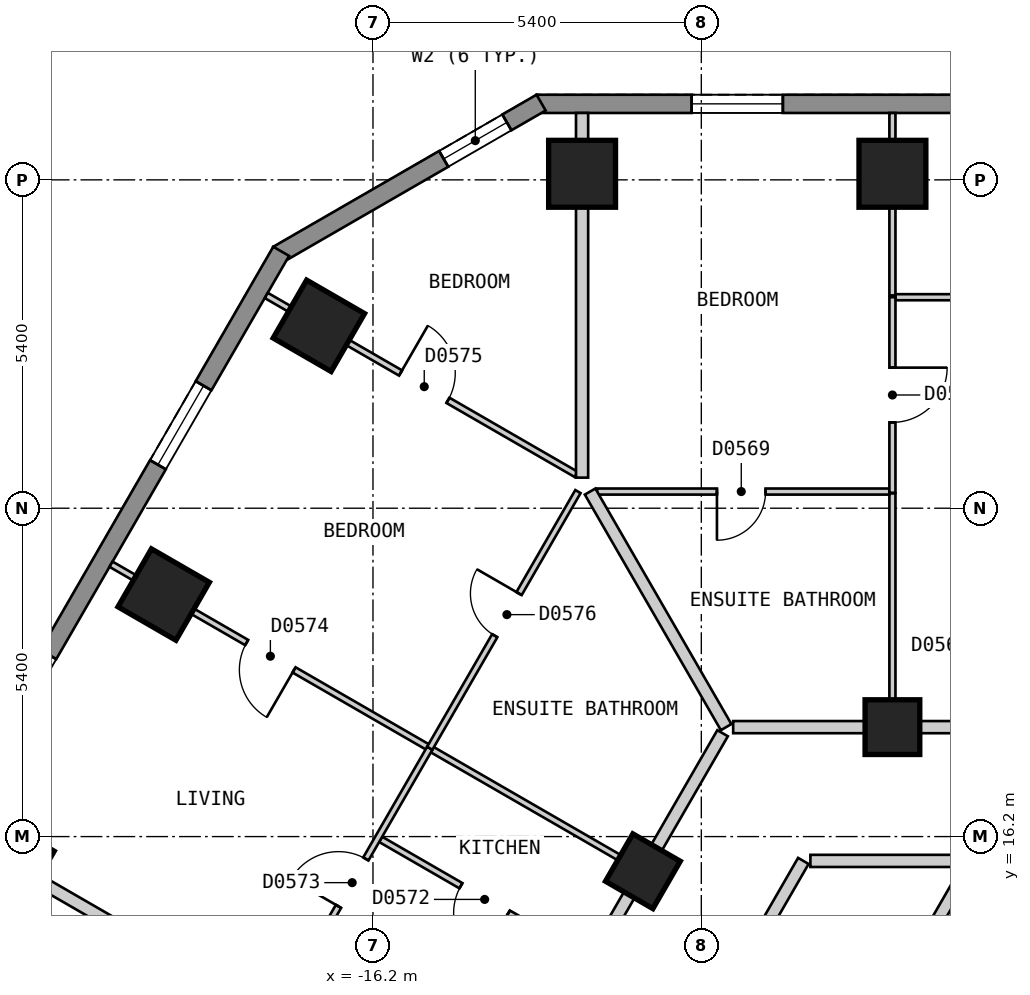
"""IFC4 building model, lengths in metres.
Left out: names, types, materials, properties, quantities, classifications, styles, units other than length and angle.
Written with IfcOpenShell. Run it as: python <this file> out.ifc"""

import sys

from ifc_helpers import new_model, si_unit, direction, frame, frame_2d, origin, origin_2d, place, context, subcontext, project, spatial, polyline, rectangle, outline, extrude, element, fill, save


model = new_model("IFC4")
c1 = context("Model", 3, precision=1e-05, world=origin(), true_north=direction((0.0, 1.0)))
c2 = subcontext(c1, "Body", "Model", "MODEL_VIEW")
j1 = project(units=[si_unit("LENGTHUNIT", "METRE"), si_unit("PLANEANGLEUNIT", "RADIAN")], contexts=[c1])
p1 = place(None, origin())
s1 = spatial("IfcSite", under=j1, at=p1, CompositionType="ELEMENT")
p2 = place(p1, origin())
s2 = spatial("IfcBuilding", under=s1, at=p2, CompositionType="ELEMENT")
p3 = place(p2, frame((0.0, 0.0, 44.4)))
s3 = spatial("IfcBuildingStorey", under=s2, at=p3, CompositionType="ELEMENT", Elevation=44.4)
for number, where, z_axis, x_axis in (
    (1, (-7.657, 27.1, 0.0), (0.0, 0.0, 1.0), (-1.0, 0.0, 0.0)),
    (2, (-12.761, 27.1, 0.0), (0.0, 0.0, 1.0), (-1.0, 0.0, 0.0)),
    (3, (-17.09, 24.6, 0.0), (0.0, 0.0, 1.0), (-0.5, -0.866, 0.0)),
    (4, (-19.642, 20.18, 0.0), (0.0, 0.0, 1.0), (-0.5, -0.866, 0.0)),
    (5, (-22.194, 15.759, 0.0), (0.0, 0.0, 1.0), (-0.5, -0.866, 0.0)),
):
    element("IfcColumn", number, at=place(p3, frame(where, z_axis=z_axis, x_axis=x_axis)), inside=s3, PredefinedType="COLUMN", context=c2, shape_type="SweptSolid", body=[
        extrude(rectangle(XDim=1.1, YDim=1.1, at=origin_2d()), origin(), (0.0, 0.0, 1.0), 3.0),
    ])
for number, where, z_axis, x_axis in (
    (6, (-7.657, 18.0, 0.0), (0.0, 0.0, 1.0), (-1.0, 0.0, 0.0)),
    (7, (-11.761, 15.63, 0.0), (0.0, 0.0, 1.0), (-0.5, -0.866, 0.0)),
):
    element("IfcColumn", number, at=place(p3, frame(where, z_axis=z_axis, x_axis=x_axis)), inside=s3, PredefinedType="COLUMN", context=c2, shape_type="SweptSolid", body=[
        extrude(rectangle(XDim=0.9, YDim=0.9, at=origin_2d()), origin(), (0.0, 0.0, 1.0), 3.0),
    ])
p4 = place(p3, frame((13.51, 28.25, 0.0), z_axis=(0.0, 0.0, 1.0), x_axis=(-1.0, 0.0, 0.0)))
e8 = element("IfcWall", 8, at=p4, inside=s3, PredefinedType="SOLIDWALL", context=c2, shape_type="SweptSolid", body=[
    extrude(outline(polyline([(0.0, -0.15), (27.02, -0.15), (26.94, 0.15), (0.08, 0.15), (0.0, -0.15)])), origin(), (0.0, 0.0, 1.0), 2.7),
])
p5 = place(p4, frame((2.553, 0.0, 0.15)))
e9 = element("IfcOpeningElement", 9, at=p5, cuts=e8, PredefinedType="OPENING", context=c2, shape_type="SweptSolid", body=[
    extrude(rectangle(XDim=1.5, YDim=2.1, at=frame_2d((0.75, 1.05))), frame((0.0, 0.16, 0.0), z_axis=(0.0, -1.0, 0.0), x_axis=(1.0, 0.0, 0.0)), (0.0, 0.0, 1.0), 0.32),
])
p6 = place(p4, frame((7.657, 0.0, 0.15)))
e10 = element("IfcOpeningElement", 10, at=p6, cuts=e8, PredefinedType="OPENING", context=c2, shape_type="SweptSolid", body=[
    extrude(rectangle(XDim=1.5, YDim=2.1, at=frame_2d((0.75, 1.05))), frame((0.0, 0.16, 0.0), z_axis=(0.0, -1.0, 0.0), x_axis=(1.0, 0.0, 0.0)), (0.0, 0.0, 1.0), 0.32),
])
p7 = place(p4, frame((12.761, 0.0, 0.15)))
e11 = element("IfcOpeningElement", 11, at=p7, cuts=e8, PredefinedType="OPENING", context=c2, shape_type="SweptSolid", body=[
    extrude(rectangle(XDim=1.5, YDim=2.1, at=frame_2d((0.75, 1.05))), frame((0.0, 0.16, 0.0), z_axis=(0.0, -1.0, 0.0), x_axis=(1.0, 0.0, 0.0)), (0.0, 0.0, 1.0), 0.32),
])
p8 = place(p4, frame((17.865, 0.0, 0.15)))
e12 = element("IfcOpeningElement", 12, at=p8, cuts=e8, PredefinedType="OPENING", context=c2, shape_type="SweptSolid", body=[
    extrude(rectangle(XDim=1.5, YDim=2.1, at=frame_2d((0.75, 1.05))), frame((0.0, 0.16, 0.0), z_axis=(0.0, -1.0, 0.0), x_axis=(1.0, 0.0, 0.0)), (0.0, 0.0, 1.0), 0.32),
])
p9 = place(p4, frame((22.969, 0.0, 0.15)))
e13 = element("IfcOpeningElement", 13, at=p9, cuts=e8, PredefinedType="OPENING", context=c2, shape_type="SweptSolid", body=[
    extrude(rectangle(XDim=1.5, YDim=2.1, at=frame_2d((0.75, 1.05))), frame((0.0, 0.16, 0.0), z_axis=(0.0, -1.0, 0.0), x_axis=(1.0, 0.0, 0.0)), (0.0, 0.0, 1.0), 0.32),
])
p10 = place(p3, frame((-13.435, 28.27, 0.0), z_axis=(0.0, 0.0, 1.0), x_axis=(-0.866010750942, -0.50002537861, 0.0)))
e14 = element("IfcWall", 14, at=p10, inside=s3, PredefinedType="SOLIDWALL", context=c2, shape_type="SweptSolid", body=[
    extrude(outline(polyline([(0.0, -0.15), (5.0, -0.15), (4.919, 0.15), (0.08, 0.15), (0.0, -0.15)])), origin(), (0.0, 0.0, 1.0), 2.7),
])
p11 = place(p10, frame((0.65, 0.0, 0.15)))
e15 = element("IfcOpeningElement", 15, at=p11, cuts=e14, PredefinedType="OPENING", context=c2, shape_type="SweptSolid", body=[
    extrude(rectangle(XDim=1.2, YDim=2.1, at=frame_2d((0.6, 1.05))), frame((0.0, 0.16, 0.0), z_axis=(0.0, -1.0, 0.0), x_axis=(1.0, 0.0, 0.0)), (0.0, 0.0, 1.0), 0.32),
])
p12 = place(p3, frame((-17.71, 25.825, 0.0), z_axis=(0.0, 0.0, 1.0), x_axis=(-0.500001938803, -0.866024284413, 0.0)))
e16 = element("IfcWall", 16, at=p12, inside=s3, PredefinedType="SOLIDWALL", context=c2, shape_type="SweptSolid", body=[
    extrude(outline(polyline([(0.0, -0.15), (27.02, -0.15), (26.94, 0.15), (0.08, 0.15), (0.0, -0.15)])), origin(), (0.0, 0.0, 1.0), 2.7),
])
p13 = place(p12, frame((2.553, 0.0, 0.15)))
e17 = element("IfcOpeningElement", 17, at=p13, cuts=e16, PredefinedType="OPENING", context=c2, shape_type="SweptSolid", body=[
    extrude(rectangle(XDim=1.5, YDim=2.1, at=frame_2d((0.75, 1.05))), frame((0.0, 0.16, 0.0), z_axis=(0.0, -1.0, 0.0), x_axis=(1.0, 0.0, 0.0)), (0.0, 0.0, 1.0), 0.32),
])
p14 = place(p12, frame((7.658, 0.0, 0.15)))
e18 = element("IfcOpeningElement", 18, at=p14, cuts=e16, PredefinedType="OPENING", context=c2, shape_type="SweptSolid", body=[
    extrude(rectangle(XDim=1.5, YDim=2.1, at=frame_2d((0.75, 1.05))), frame((0.0, 0.16, 0.0), z_axis=(0.0, -1.0, 0.0), x_axis=(1.0, 0.0, 0.0)), (0.0, 0.0, 1.0), 0.32),
])
p15 = place(p12, frame((12.761, 0.0, 0.15)))
e19 = element("IfcOpeningElement", 19, at=p15, cuts=e16, PredefinedType="OPENING", context=c2, shape_type="SweptSolid", body=[
    extrude(rectangle(XDim=1.5, YDim=2.1, at=frame_2d((0.75, 1.05))), frame((0.0, 0.16, 0.0), z_axis=(0.0, -1.0, 0.0), x_axis=(1.0, 0.0, 0.0)), (0.0, 0.0, 1.0), 0.32),
])
p16 = place(p12, frame((17.865, 0.0, 0.15)))
e20 = element("IfcOpeningElement", 20, at=p16, cuts=e16, PredefinedType="OPENING", context=c2, shape_type="SweptSolid", body=[
    extrude(rectangle(XDim=1.5, YDim=2.1, at=frame_2d((0.75, 1.05))), frame((0.0, 0.16, 0.0), z_axis=(0.0, -1.0, 0.0), x_axis=(1.0, 0.0, 0.0)), (0.0, 0.0, 1.0), 0.32),
])
p17 = place(p12, frame((22.969, 0.0, 0.15)))
e21 = element("IfcOpeningElement", 21, at=p17, cuts=e16, PredefinedType="OPENING", context=c2, shape_type="SweptSolid", body=[
    extrude(rectangle(XDim=1.5, YDim=2.1, at=frame_2d((0.75, 1.05))), frame((0.0, 0.16, 0.0), z_axis=(0.0, -1.0, 0.0), x_axis=(1.0, 0.0, 0.0)), (0.0, 0.0, 1.0), 0.32),
])
p18 = place(p3, frame((-9.006, 15.8, 0.0), z_axis=(0.0, 0.0, 1.0), x_axis=(1.0, 0.0, 0.0)))
e22 = element("IfcWall", 22, at=p18, inside=s3, PredefinedType="PARTITIONING", context=c2, shape_type="SweptSolid", body=[
    extrude(rectangle(XDim=2.54, YDim=0.2, at=frame_2d((1.27, 0.0))), origin(), (0.0, 0.0, 1.0), 2.7),
])
p19 = place(p3, frame((-10.276, 18.0, 0.0), z_axis=(0.0, 0.0, 1.0), x_axis=(1.0, 0.0, 0.0)))
e23 = element("IfcWall", 23, at=p19, inside=s3, PredefinedType="PARTITIONING", context=c2, shape_type="SweptSolid", body=[
    extrude(rectangle(XDim=20.553, YDim=0.2, at=frame_2d((10.276, 0.0))), origin(), (0.0, 0.0, 1.0), 2.7),
])
p20 = place(p19, frame((14.879, 0.0, 0.0)))
e24 = element("IfcOpeningElement", 24, at=p20, cuts=e23, PredefinedType="OPENING", context=c2, shape_type="SweptSolid", body=[
    extrude(rectangle(XDim=1.0, YDim=2.1, at=frame_2d((0.5, 1.05))), frame((0.0, 0.11, 0.0), z_axis=(0.0, -1.0, 0.0), x_axis=(1.0, 0.0, 0.0)), (0.0, 0.0, 1.0), 0.22),
])
p21 = place(p19, frame((4.671, 0.0, 0.0)))
e25 = element("IfcOpeningElement", 25, at=p21, cuts=e23, PredefinedType="OPENING", context=c2, shape_type="SweptSolid", body=[
    extrude(rectangle(XDim=1.0, YDim=2.1, at=frame_2d((0.5, 1.05))), frame((0.0, 0.11, 0.0), z_axis=(0.0, -1.0, 0.0), x_axis=(1.0, 0.0, 0.0)), (0.0, 0.0, 1.0), 0.22),
])
p22 = place(p3, frame((-10.854, 8.0, 0.0), z_axis=(0.0, 0.0, 1.0), x_axis=(0.499964141897, 0.86604610548, 0.0)))
e26 = element("IfcWall", 26, at=p22, inside=s3, PredefinedType="PARTITIONING", context=c2, shape_type="SweptSolid", body=[
    extrude(rectangle(XDim=9.007, YDim=0.2, at=frame_2d((4.503, 0.0))), origin(), (0.0, 0.0, 1.0), 2.7),
])
p23 = place(p3, frame((-18.244, -0.001, 0.0), z_axis=(0.0, 0.0, 1.0), x_axis=(0.499962999376, 0.866046765051, 0.0)))
e27 = element("IfcWall", 27, at=p23, inside=s3, PredefinedType="PARTITIONING", context=c2, shape_type="SweptSolid", body=[
    extrude(rectangle(XDim=18.245, YDim=0.2, at=frame_2d((9.123, 0.0))), origin(), (0.0, 0.0, 1.0), 2.7),
])
p24 = place(p23, frame((8.672, 0.0, 0.0)))
e28 = element("IfcOpeningElement", 28, at=p24, cuts=e27, PredefinedType="OPENING", context=c2, shape_type="SweptSolid", body=[
    extrude(rectangle(XDim=0.9, YDim=2.1, at=frame_2d((0.45, 1.05))), frame((0.0, 0.11, 0.0), z_axis=(0.0, -1.0, 0.0), x_axis=(1.0, 0.0, 0.0)), (0.0, 0.0, 1.0), 0.22),
])
p25 = place(p3, frame((-20.727, 0.099, 0.0), z_axis=(0.0, 0.0, 1.0), x_axis=(0.499993204491, 0.866029327138, 0.0)))
e29 = element("IfcWall", 29, at=p25, inside=s3, PredefinedType="PARTITIONING", context=c2, shape_type="SweptSolid", body=[
    extrude(rectangle(XDim=20.554, YDim=0.2, at=frame_2d((10.277, 0.0))), origin(), (0.0, 0.0, 1.0), 2.7),
])
p26 = place(p25, frame((9.776, 0.0, 0.0)))
e30 = element("IfcOpeningElement", 30, at=p26, cuts=e29, PredefinedType="OPENING", context=c2, shape_type="SweptSolid", body=[
    extrude(rectangle(XDim=1.0, YDim=2.1, at=frame_2d((0.5, 1.05))), frame((0.0, 0.11, 0.0), z_axis=(0.0, -1.0, 0.0), x_axis=(1.0, 0.0, 0.0)), (0.0, 0.0, 1.0), 0.22),
])
p27 = place(p25, frame((4.673, 0.0, 0.0)))
e31 = element("IfcOpeningElement", 31, at=p27, cuts=e29, PredefinedType="OPENING", context=c2, shape_type="SweptSolid", body=[
    extrude(rectangle(XDim=1.0, YDim=2.1, at=frame_2d((0.5, 1.05))), frame((0.0, 0.11, 0.0), z_axis=(0.0, -1.0, 0.0), x_axis=(1.0, 0.0, 0.0)), (0.0, 0.0, 1.0), 0.22),
])
p28 = place(p25, frame((14.88, 0.0, 0.0)))
e32 = element("IfcOpeningElement", 32, at=p28, cuts=e29, PredefinedType="OPENING", context=c2, shape_type="SweptSolid", body=[
    extrude(rectangle(XDim=1.0, YDim=2.1, at=frame_2d((0.5, 1.05))), frame((0.0, 0.11, 0.0), z_axis=(0.0, -1.0, 0.0), x_axis=(1.0, 0.0, 0.0)), (0.0, 0.0, 1.0), 0.22),
])
p29 = place(p3, frame((-7.657, 28.1, 0.0), z_axis=(0.0, 0.0, 1.0), x_axis=(0.0, -1.0, 0.0)))
e33 = element("IfcWall", 33, at=p29, inside=s3, PredefinedType="PARTITIONING", context=c2, shape_type="SweptSolid", body=[
    extrude(rectangle(XDim=3.0, YDim=0.1, at=frame_2d((1.5, 0.0))), origin(), (0.0, 0.0, 1.0), 2.7),
])
p30 = place(p3, frame((-7.657, 21.844, 0.0), z_axis=(0.0, 0.0, 1.0), x_axis=(0.0, -1.0, 0.0)))
e34 = element("IfcWall", 34, at=p30, inside=s3, PredefinedType="PARTITIONING", context=c2, shape_type="SweptSolid", body=[
    extrude(rectangle(XDim=3.744, YDim=0.1, at=frame_2d((1.872, 0.0))), origin(), (0.0, 0.0, 1.0), 2.7),
])
p31 = place(p3, frame((-16.073, 16.154, 0.0), z_axis=(0.0, 0.0, 1.0), x_axis=(0.865979019114, -0.500080332001, 0.0)))
e35 = element("IfcWall", 35, at=p31, inside=s3, PredefinedType="PARTITIONING", context=c2, shape_type="SweptSolid", body=[
    extrude(rectangle(XDim=3.897, YDim=0.1, at=frame_2d((1.949, 0.0))), origin(), (0.0, 0.0, 1.0), 2.7),
])
p32 = place(p31, frame((1.524, 0.0, 0.0)))
e36 = element("IfcOpeningElement", 36, at=p32, cuts=e35, PredefinedType="OPENING", context=c2, shape_type="SweptSolid", body=[
    extrude(rectangle(XDim=0.9, YDim=2.1, at=frame_2d((0.45, 1.05))), frame((0.0, 0.06, 0.0), z_axis=(0.0, -1.0, 0.0), x_axis=(1.0, 0.0, 0.0)), (0.0, 0.0, 1.0), 0.12),
])
p33 = place(p3, frame((-20.508, 20.679, 0.0), z_axis=(0.0, 0.0, 1.0), x_axis=(0.866047370643, -0.499961950354, 0.0)))
e37 = element("IfcWall", 37, at=p33, inside=s3, PredefinedType="PARTITIONING", context=c2, shape_type="SweptSolid", body=[
    extrude(rectangle(XDim=10.001, YDim=0.1, at=frame_2d((5.0, 0.0))), origin(), (0.0, 0.0, 1.0), 2.7),
])
p34 = place(p33, frame((2.576, 0.0, 0.0)))
e38 = element("IfcOpeningElement", 38, at=p34, cuts=e37, PredefinedType="OPENING", context=c2, shape_type="SweptSolid", body=[
    extrude(rectangle(XDim=0.9, YDim=2.1, at=frame_2d((0.45, 1.05))), frame((0.0, 0.06, 0.0), z_axis=(0.0, -1.0, 0.0), x_axis=(1.0, 0.0, 0.0)), (0.0, 0.0, 1.0), 0.12),
])
p35 = place(p3, frame((-17.955, 25.099, 0.0), z_axis=(0.0, 0.0, 1.0), x_axis=(0.866036353684, -0.499981033738, 0.0)))
e39 = element("IfcWall", 39, at=p35, inside=s3, PredefinedType="PARTITIONING", context=c2, shape_type="SweptSolid", body=[
    extrude(rectangle(XDim=5.885, YDim=0.1, at=frame_2d((2.942, 0.0))), origin(), (0.0, 0.0, 1.0), 2.7),
])
p36 = place(p35, frame((2.55, 0.0, 0.0)))
e40 = element("IfcOpeningElement", 40, at=p36, cuts=e39, PredefinedType="OPENING", context=c2, shape_type="SweptSolid", body=[
    extrude(rectangle(XDim=0.9, YDim=2.1, at=frame_2d((0.45, 1.05))), frame((0.0, 0.06, 0.0), z_axis=(0.0, -1.0, 0.0), x_axis=(1.0, 0.0, 0.0)), (0.0, 0.0, 1.0), 0.12),
])
p37 = place(p3, frame((-12.513, 21.874, 0.0), z_axis=(0.0, 0.0, 1.0), x_axis=(1.0, 0.0, 0.0)))
e41 = element("IfcWall", 41, at=p37, inside=s3, PredefinedType="PARTITIONING", context=c2, shape_type="SweptSolid", body=[
    extrude(rectangle(XDim=4.806, YDim=0.1, at=frame_2d((2.403, 0.0))), origin(), (0.0, 0.0, 1.0), 2.7),
])
p38 = place(p37, frame((1.97, 0.0, 0.0)))
e42 = element("IfcOpeningElement", 42, at=p38, cuts=e41, PredefinedType="OPENING", context=c2, shape_type="SweptSolid", body=[
    extrude(rectangle(XDim=0.8, YDim=2.1, at=frame_2d((0.4, 1.05))), frame((0.0, 0.06, 0.0), z_axis=(0.0, -1.0, 0.0), x_axis=(1.0, 0.0, 0.0)), (0.0, 0.0, 1.0), 0.12),
])
p39 = place(p3, frame((-7.607, 25.07, 0.0), z_axis=(0.0, 0.0, 1.0), x_axis=(1.0, 0.0, 0.0)))
e43 = element("IfcWall", 43, at=p39, inside=s3, PredefinedType="PARTITIONING", context=c2, shape_type="SweptSolid", body=[
    extrude(rectangle(XDim=4.954, YDim=0.1, at=frame_2d((2.477, 0.0))), origin(), (0.0, 0.0, 1.0), 2.7),
])
p40 = place(p39, frame((2.052, 0.0, 0.0)))
e44 = element("IfcOpeningElement", 44, at=p40, cuts=e43, PredefinedType="OPENING", context=c2, shape_type="SweptSolid", body=[
    extrude(rectangle(XDim=0.9, YDim=2.1, at=frame_2d((0.45, 1.05))), frame((0.0, 0.06, 0.0), z_axis=(0.0, -1.0, 0.0), x_axis=(1.0, 0.0, 0.0)), (0.0, 0.0, 1.0), 0.12),
])
p41 = place(p3, frame((-17.768, 13.319, 0.0), z_axis=(0.0, 0.0, 1.0), x_axis=(0.499958946799, 0.866049104564, 0.0)))
e45 = element("IfcWall", 45, at=p41, inside=s3, PredefinedType="PARTITIONING", context=c2, shape_type="SweptSolid", body=[
    extrude(rectangle(XDim=5.004, YDim=0.1, at=frame_2d((2.502, 0.0))), origin(), (0.0, 0.0, 1.0), 2.7),
])
p42 = place(p41, frame((2.002, 0.0, 0.0)))
e46 = element("IfcOpeningElement", 46, at=p42, cuts=e45, PredefinedType="OPENING", context=c2, shape_type="SweptSolid", body=[
    extrude(rectangle(XDim=0.9, YDim=2.1, at=frame_2d((0.45, 1.05))), frame((0.0, 0.06, 0.0), z_axis=(0.0, -1.0, 0.0), x_axis=(1.0, 0.0, 0.0)), (0.0, 0.0, 1.0), 0.12),
])
p43 = place(p3, frame((-7.657, 21.854, 0.0), z_axis=(0.0, 0.0, 1.0), x_axis=(0.0, 1.0, 0.0)))
e47 = element("IfcWall", 47, at=p43, inside=s3, PredefinedType="PARTITIONING", context=c2, shape_type="SweptSolid", body=[
    extrude(rectangle(XDim=3.216, YDim=0.1, at=frame_2d((1.608, 0.0))), origin(), (0.0, 0.0, 1.0), 2.7),
])
p44 = place(p43, frame((1.158, 0.0, 0.0)))
e48 = element("IfcOpeningElement", 48, at=p44, cuts=e47, PredefinedType="OPENING", context=c2, shape_type="SweptSolid", body=[
    extrude(rectangle(XDim=0.9, YDim=2.1, at=frame_2d((0.45, 1.05))), frame((0.0, 0.06, 0.0), z_axis=(0.0, -1.0, 0.0), x_axis=(1.0, 0.0, 0.0)), (0.0, 0.0, 1.0), 0.12),
])
p45 = place(p3, frame((-12.629, 21.874, 0.0), z_axis=(0.0, 0.0, 1.0), x_axis=(0.500024801635, -0.86601108408, 0.0)))
e49 = element("IfcWall", 49, at=p45, inside=s3, PredefinedType="PARTITIONING", context=c2, shape_type="SweptSolid", body=[
    extrude(rectangle(XDim=4.473, YDim=0.2, at=frame_2d((2.237, 0.0))), origin(), (0.0, 0.0, 1.0), 2.7),
])
p46 = place(p3, frame((-23.06, 16.259, 0.0), z_axis=(0.0, 0.0, 1.0), x_axis=(0.866047370643, -0.499961950354, 0.0)))
e50 = element("IfcWall", 50, at=p46, inside=s3, PredefinedType="PARTITIONING", context=c2, shape_type="SweptSolid", body=[
    extrude(rectangle(XDim=10.001, YDim=0.2, at=frame_2d((5.0, 0.0))), origin(), (0.0, 0.0, 1.0), 2.7),
])
p47 = place(p3, frame((-12.761, 22.103, 0.0), z_axis=(0.0, 0.0, 1.0), x_axis=(0.0, 1.0, 0.0)))
e51 = element("IfcWall", 51, at=p47, inside=s3, PredefinedType="PARTITIONING", context=c2, shape_type="SweptSolid", body=[
    extrude(rectangle(XDim=5.997, YDim=0.2, at=frame_2d((2.999, 0.0))), origin(), (0.0, 0.0, 1.0), 2.7),
])
p48 = place(p3, frame((-15.266, 17.653, 0.0), z_axis=(0.0, 0.0, 1.0), x_axis=(0.500007182864, 0.866021256716, 0.0)))
e52 = element("IfcWall", 52, at=p48, inside=s3, PredefinedType="PARTITIONING", context=c2, shape_type="SweptSolid", body=[
    extrude(rectangle(XDim=4.874, YDim=0.1, at=frame_2d((2.437, 0.0))), origin(), (0.0, 0.0, 1.0), 2.7),
])
p49 = place(p48, frame((2.137, 0.0, 0.0)))
e53 = element("IfcOpeningElement", 53, at=p49, cuts=e52, PredefinedType="OPENING", context=c2, shape_type="SweptSolid", body=[
    extrude(rectangle(XDim=0.8, YDim=2.1, at=frame_2d((0.4, 1.05))), frame((0.0, 0.06, 0.0), z_axis=(0.0, -1.0, 0.0), x_axis=(1.0, 0.0, 0.0)), (0.0, 0.0, 1.0), 0.12),
])
p50 = place(p9, origin())
e54 = element("IfcWindow", 54, at=p50, inside=s3, PartitioningType="SINGLE_PANEL", PredefinedType="WINDOW", context=c2, shape_type="SweptSolid", body=[
    extrude(rectangle(XDim=1.5, YDim=2.1, at=frame_2d((0.75, 1.05))), frame((0.0, 0.03, 0.0), z_axis=(0.0, -1.0, 0.0), x_axis=(1.0, 0.0, 0.0)), (0.0, 0.0, 1.0), 0.06),
])
fill(e13, e54)
p51 = place(p11, origin())
e55 = element("IfcWindow", 55, at=p51, inside=s3, PartitioningType="SINGLE_PANEL", PredefinedType="WINDOW", context=c2, shape_type="SweptSolid", body=[
    extrude(rectangle(XDim=1.2, YDim=2.1, at=frame_2d((0.6, 1.05))), frame((0.0, 0.03, 0.0), z_axis=(0.0, -1.0, 0.0), x_axis=(1.0, 0.0, 0.0)), (0.0, 0.0, 1.0), 0.06),
])
fill(e15, e55)
p52 = place(p13, origin())
e56 = element("IfcWindow", 56, at=p52, inside=s3, PartitioningType="SINGLE_PANEL", PredefinedType="WINDOW", context=c2, shape_type="SweptSolid", body=[
    extrude(rectangle(XDim=1.5, YDim=2.1, at=frame_2d((0.75, 1.05))), frame((0.0, 0.03, 0.0), z_axis=(0.0, -1.0, 0.0), x_axis=(1.0, 0.0, 0.0)), (0.0, 0.0, 1.0), 0.06),
])
fill(e17, e56)
p53 = place(p44, origin())
e57 = element("IfcDoor", 57, at=p53, inside=s3, OperationType="SINGLE_SWING_RIGHT", PredefinedType="DOOR", context=c2, shape_type="SweptSolid", body=[
    extrude(rectangle(XDim=0.9, YDim=2.1, at=frame_2d((0.45, 1.05))), frame((0.0, 0.025, 0.0), z_axis=(0.0, -1.0, 0.0), x_axis=(1.0, 0.0, 0.0)), (0.0, 0.0, 1.0), 0.05),
])
fill(e48, e57)
p54 = place(p38, origin())
e58 = element("IfcDoor", 58, at=p54, inside=s3, OperationType="SINGLE_SWING_LEFT", PredefinedType="DOOR", context=c2, shape_type="SweptSolid", body=[
    extrude(rectangle(XDim=0.8, YDim=2.1, at=frame_2d((0.4, 1.05))), frame((0.0, 0.025, 0.0), z_axis=(0.0, -1.0, 0.0), x_axis=(1.0, 0.0, 0.0)), (0.0, 0.0, 1.0), 0.05),
])
fill(e42, e58)
p55 = place(p32, origin())
e59 = element("IfcDoor", 59, at=p55, inside=s3, OperationType="SINGLE_SWING_RIGHT", PredefinedType="DOOR", context=c2, shape_type="SweptSolid", body=[
    extrude(rectangle(XDim=0.9, YDim=2.1, at=frame_2d((0.45, 1.05))), frame((0.0, 0.025, 0.0), z_axis=(0.0, -1.0, 0.0), x_axis=(1.0, 0.0, 0.0)), (0.0, 0.0, 1.0), 0.05),
])
fill(e36, e59)
p56 = place(p42, origin())
e60 = element("IfcDoor", 60, at=p56, inside=s3, OperationType="SINGLE_SWING_LEFT", PredefinedType="DOOR", context=c2, shape_type="SweptSolid", body=[
    extrude(rectangle(XDim=0.9, YDim=2.1, at=frame_2d((0.45, 1.05))), frame((0.0, 0.025, 0.0), z_axis=(0.0, -1.0, 0.0), x_axis=(1.0, 0.0, 0.0)), (0.0, 0.0, 1.0), 0.05),
])
fill(e46, e60)
p57 = place(p34, origin())
e61 = element("IfcDoor", 61, at=p57, inside=s3, OperationType="SINGLE_SWING_RIGHT", PredefinedType="DOOR", context=c2, shape_type="SweptSolid", body=[
    extrude(rectangle(XDim=0.9, YDim=2.1, at=frame_2d((0.45, 1.05))), frame((0.0, 0.025, 0.0), z_axis=(0.0, -1.0, 0.0), x_axis=(1.0, 0.0, 0.0)), (0.0, 0.0, 1.0), 0.05),
])
fill(e38, e61)
p58 = place(p36, origin())
e62 = element("IfcDoor", 62, at=p58, inside=s3, OperationType="SINGLE_SWING_LEFT", PredefinedType="DOOR", context=c2, shape_type="SweptSolid", body=[
    extrude(rectangle(XDim=0.9, YDim=2.1, at=frame_2d((0.45, 1.05))), frame((0.0, 0.025, 0.0), z_axis=(0.0, -1.0, 0.0), x_axis=(1.0, 0.0, 0.0)), (0.0, 0.0, 1.0), 0.05),
])
fill(e40, e62)
p59 = place(p49, origin())
e63 = element("IfcDoor", 63, at=p59, inside=s3, OperationType="SINGLE_SWING_RIGHT", PredefinedType="DOOR", context=c2, shape_type="SweptSolid", body=[
    extrude(rectangle(XDim=0.8, YDim=2.1, at=frame_2d((0.4, 1.05))), frame((0.0, 0.025, 0.0), z_axis=(0.0, -1.0, 0.0), x_axis=(1.0, 0.0, 0.0)), (0.0, 0.0, 1.0), 0.05),
])
fill(e53, e63)
save(model, sys.argv[1])
